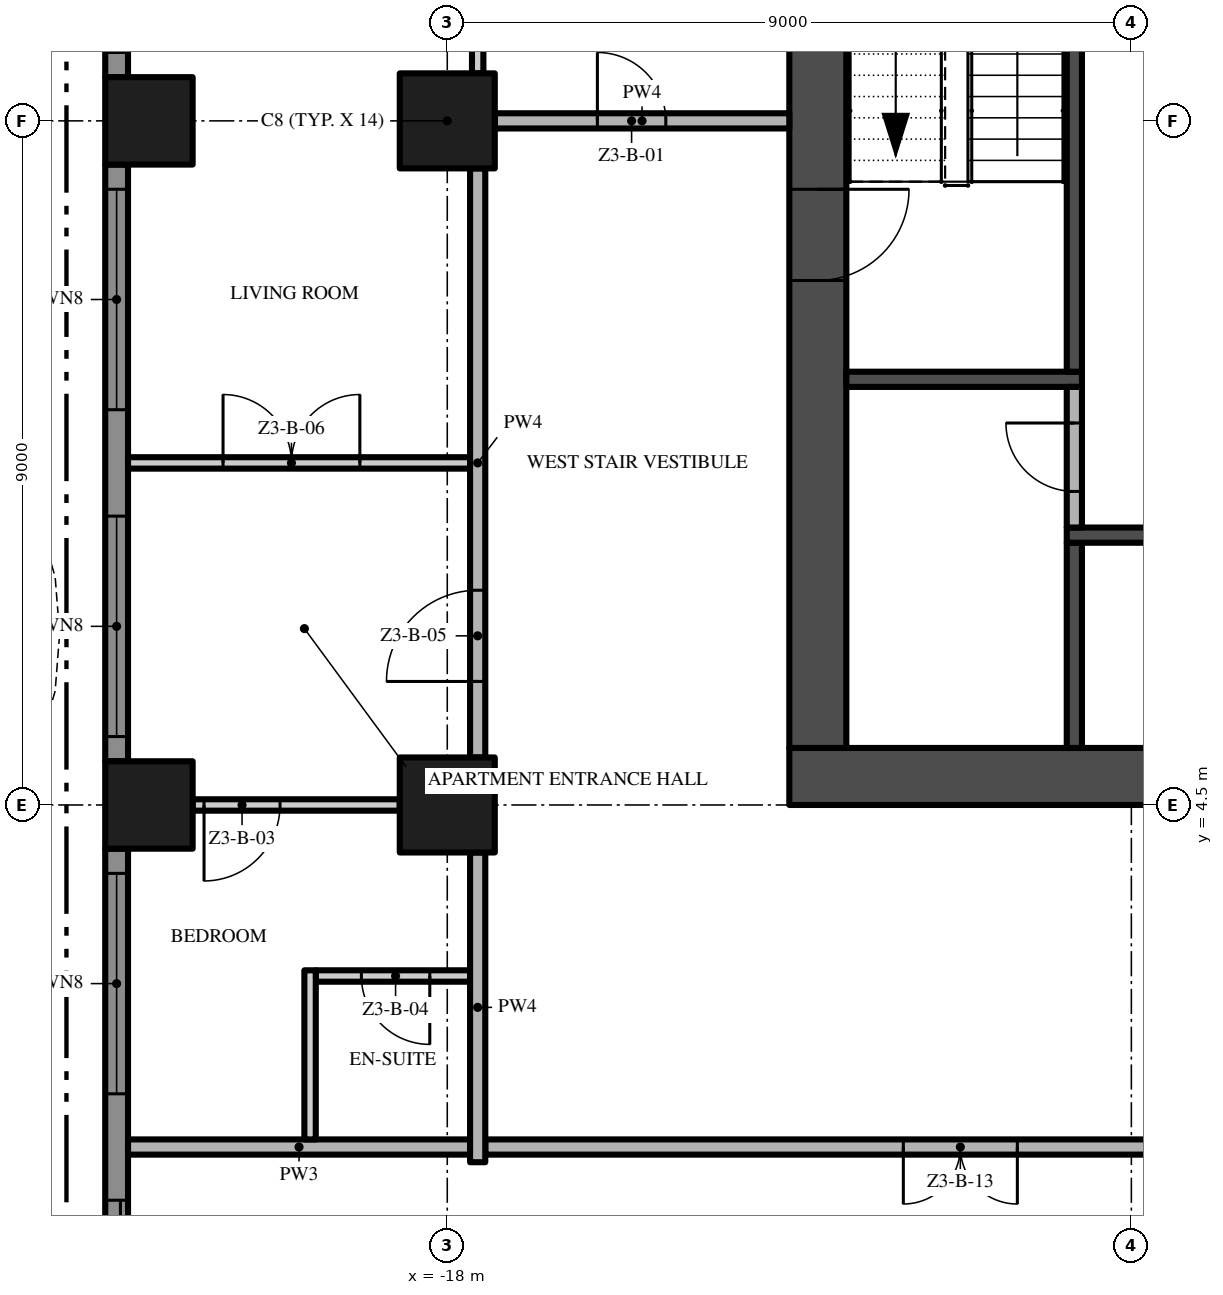
"""IFC4 building model, lengths in metres.
Left out: names, types, materials, properties, quantities, classifications, styles, units other than length and angle.
Written with IfcOpenShell. Run it as: python <this file> out.ifc"""

import sys

from ifc_helpers import new_model, si_unit, direction, frame, frame_2d, origin, origin_2d, place, context, subcontext, project, spatial, polyline, rectangle, outline, extrude, element, fill, save


model = new_model("IFC4")
c1 = context("Model", 3, precision=1e-05, world=origin(), true_north=direction((0.0, 1.0)))
c2 = subcontext(c1, "Body", "Model", "MODEL_VIEW")
j1 = project(units=[si_unit("LENGTHUNIT", "METRE"), si_unit("PLANEANGLEUNIT", "RADIAN")], contexts=[c1])
p1 = place(None, origin())
s1 = spatial("IfcSite", under=j1, at=p1, CompositionType="ELEMENT")
p2 = place(p1, origin())
s2 = spatial("IfcBuilding", under=s1, at=p2, CompositionType="ELEMENT")
p3 = place(p2, frame((0.0, 0.0, 144.0)))
s3 = spatial("IfcBuildingStorey", under=s2, at=p3, CompositionType="ELEMENT", Elevation=144.0)
p4 = place(p3, frame((-13.5, 4.875, -0.3), z_axis=(0.0, 0.0, 1.0), x_axis=(1.0, 0.0, 0.0)))
e1 = element("IfcWall", 1, at=p4, inside=s3, PredefinedType="SHEAR", context=c2, shape_type="SweptSolid", body=[
    extrude(rectangle(XDim=27.0, YDim=0.75, at=frame_2d((13.5, 0.0))), origin(), (0.0, 0.0, 1.0), 3.8),
])
p5 = place(p4, frame((12.0, 0.0, 0.3)))
e2 = element("IfcOpeningElement", 2, at=p5, cuts=e1, PredefinedType="OPENING", context=c2, shape_type="SweptSolid", body=[
    extrude(rectangle(XDim=3.0, YDim=2.4, at=frame_2d((1.5, 1.2))), frame((0.0, 0.385, 0.0), z_axis=(0.0, -1.0, 0.0), x_axis=(1.0, 0.0, 0.0)), (0.0, 0.0, 1.0), 0.77),
])
p6 = place(p4, frame((4.9, 0.0, 0.3)))
e3 = element("IfcOpeningElement", 3, at=p6, cuts=e1, PredefinedType="OPENING", context=c2, shape_type="SweptSolid", body=[
    extrude(rectangle(XDim=1.2, YDim=2.2, at=frame_2d((0.6, 1.1))), frame((0.0, 0.385, 0.0), z_axis=(0.0, -1.0, 0.0), x_axis=(1.0, 0.0, 0.0)), (0.0, 0.0, 1.0), 0.77),
])
p7 = place(p4, frame((20.75, 0.0, 0.3)))
e4 = element("IfcOpeningElement", 4, at=p7, cuts=e1, PredefinedType="OPENING", context=c2, shape_type="SweptSolid", body=[
    extrude(rectangle(XDim=1.5, YDim=2.2, at=frame_2d((0.75, 1.1))), frame((0.0, 0.385, 0.0), z_axis=(0.0, -1.0, 0.0), x_axis=(1.0, 0.0, 0.0)), (0.0, 0.0, 1.0), 0.77),
])
p8 = place(p4, frame((17.4, 0.0, 0.3)))
e5 = element("IfcOpeningElement", 5, at=p8, cuts=e1, PredefinedType="OPENING", context=c2, shape_type="SweptSolid", body=[
    extrude(rectangle(XDim=1.2, YDim=2.2, at=frame_2d((0.6, 1.1))), frame((0.0, 0.385, 0.0), z_axis=(0.0, -1.0, 0.0), x_axis=(1.0, 0.0, 0.0)), (0.0, 0.0, 1.0), 0.77),
])
p9 = place(p3, frame((-13.125, 21.75, -0.3), z_axis=(0.0, 0.0, 1.0), x_axis=(0.0, -1.0, 0.0)))
e6 = element("IfcWall", 6, at=p9, inside=s3, PredefinedType="SHEAR", context=c2, shape_type="SweptSolid", body=[
    extrude(rectangle(XDim=16.5, YDim=0.75, at=frame_2d((8.25, 0.0))), origin(), (0.0, 0.0, 1.0), 3.8),
])
p10 = place(p9, frame((9.15, 0.0, 0.3)))
e7 = element("IfcOpeningElement", 7, at=p10, cuts=e6, PredefinedType="OPENING", context=c2, shape_type="SweptSolid", body=[
    extrude(rectangle(XDim=1.2, YDim=2.2, at=frame_2d((0.6, 1.1))), frame((0.0, 0.385, 0.0), z_axis=(0.0, -1.0, 0.0), x_axis=(1.0, 0.0, 0.0)), (0.0, 0.0, 1.0), 0.77),
])
for number, where, z_axis, x_axis in (
    (8, (-18.0, 13.5, 0.0), (0.0, 0.0, 1.0), (1.0, 0.0, 0.0)),
    (9, (-18.0, 4.5, 0.0), (0.0, 0.0, 1.0), (1.0, 0.0, 0.0)),
):
    element("IfcColumn", number, at=place(p3, frame(where, z_axis=z_axis, x_axis=x_axis)), inside=s3, PredefinedType="COLUMN", context=c2, shape_type="SweptSolid", body=[
        extrude(rectangle(XDim=1.25, YDim=1.25, at=origin_2d()), origin(), (0.0, 0.0, 1.0), 3.5),
    ])
for number, where, z_axis, x_axis in (
    (10, (-21.925, 13.5, 0.0), (0.0, 0.0, 1.0), (1.0, 0.0, 0.0)),
    (11, (-21.925, 4.5, 0.0), (0.0, 0.0, 1.0), (1.0, 0.0, 0.0)),
):
    element("IfcColumn", number, at=place(p3, frame(where, z_axis=z_axis, x_axis=x_axis)), inside=s3, PredefinedType="COLUMN", context=c2, shape_type="SweptSolid", body=[
        extrude(rectangle(XDim=1.15, YDim=1.15, at=origin_2d()), origin(), (0.0, 0.0, 1.0), 3.5),
    ])
p11 = place(p3, frame((-22.35, 14.075, 0.0), z_axis=(0.0, 0.0, 1.0), x_axis=(0.0, 1.0, 0.0)))
e12 = element("IfcWall", 12, at=p11, inside=s3, PredefinedType="SOLIDWALL", context=c2, shape_type="SweptSolid", body=[
    extrude(rectangle(XDim=3.625, YDim=0.3, at=frame_2d((1.812, 0.0))), origin(), (0.0, 0.0, 1.0), 3.5),
])
p12 = place(p11, frame((0.325, 0.0, 0.0)))
e13 = element("IfcOpeningElement", 13, at=p12, cuts=e12, PredefinedType="OPENING", context=c2, shape_type="SweptSolid", body=[
    extrude(rectangle(XDim=2.9, YDim=2.4, at=frame_2d((1.45, 1.2))), frame((0.0, 0.16, 0.0), z_axis=(0.0, -1.0, 0.0), x_axis=(1.0, 0.0, 0.0)), (0.0, 0.0, 1.0), 0.32),
])
p13 = place(p3, frame((-22.35, 5.075, 0.0), z_axis=(0.0, 0.0, 1.0), x_axis=(0.0, 1.0, 0.0)))
e14 = element("IfcWall", 14, at=p13, inside=s3, PredefinedType="SOLIDWALL", context=c2, shape_type="SweptSolid", body=[
    extrude(rectangle(XDim=7.85, YDim=0.3, at=frame_2d((3.925, 0.0))), origin(), (0.0, 0.0, 1.0), 3.5),
])
p14 = place(p13, frame((4.625, 0.0, 0.45)))
e15 = element("IfcOpeningElement", 15, at=p14, cuts=e14, PredefinedType="OPENING", context=c2, shape_type="SweptSolid", body=[
    extrude(rectangle(XDim=2.9, YDim=2.65, at=frame_2d((1.45, 1.325))), frame((0.0, 0.16, 0.0), z_axis=(0.0, -1.0, 0.0), x_axis=(1.0, 0.0, 0.0)), (0.0, 0.0, 1.0), 0.32),
])
p15 = place(p13, frame((0.325, 0.0, 0.45)))
e16 = element("IfcOpeningElement", 16, at=p15, cuts=e14, PredefinedType="OPENING", context=c2, shape_type="SweptSolid", body=[
    extrude(rectangle(XDim=2.9, YDim=2.65, at=frame_2d((1.45, 1.325))), frame((0.0, 0.16, 0.0), z_axis=(0.0, -1.0, 0.0), x_axis=(1.0, 0.0, 0.0)), (0.0, 0.0, 1.0), 0.32),
])
p16 = place(p3, frame((-22.35, -3.925, 0.0), z_axis=(0.0, 0.0, 1.0), x_axis=(0.0, 1.0, 0.0)))
e17 = element("IfcWall", 17, at=p16, inside=s3, PredefinedType="SOLIDWALL", context=c2, shape_type="SweptSolid", body=[
    extrude(rectangle(XDim=7.85, YDim=0.3, at=frame_2d((3.925, 0.0))), origin(), (0.0, 0.0, 1.0), 3.5),
])
p17 = place(p16, frame((4.625, 0.0, 0.45)))
e18 = element("IfcOpeningElement", 18, at=p17, cuts=e17, PredefinedType="OPENING", context=c2, shape_type="SweptSolid", body=[
    extrude(rectangle(XDim=2.9, YDim=2.65, at=frame_2d((1.45, 1.325))), frame((0.0, 0.16, 0.0), z_axis=(0.0, -1.0, 0.0), x_axis=(1.0, 0.0, 0.0)), (0.0, 0.0, 1.0), 0.32),
])
p18 = place(p16, frame((0.325, 0.0, 0.0)))
e19 = element("IfcOpeningElement", 19, at=p18, cuts=e17, PredefinedType="OPENING", context=c2, shape_type="SweptSolid", body=[
    extrude(rectangle(XDim=2.9, YDim=2.4, at=frame_2d((1.45, 1.2))), frame((0.0, 0.16, 0.0), z_axis=(0.0, -1.0, 0.0), x_axis=(1.0, 0.0, 0.0)), (0.0, 0.0, 1.0), 0.32),
])
p19 = place(p3, origin())
e20 = element("IfcWall", 20, at=p19, inside=s3, PredefinedType="USERDEFINED", context=c2, shape_type="SweptSolid", body=[
    extrude(outline(polyline([(-24.3, 18.0), (-25.005, 16.5), (-25.441, 15.0), (-25.5, 14.25), (-25.441, 13.5), (-25.005, 12.0), (-24.3, 10.5), (-23.595, 9.0), (-23.159, 7.5), (-23.1, 6.75), (-23.159, 6.0), (-23.595, 4.5), (-24.3, 3.0), (-25.005, 1.5), (-25.441, 0.0), (-25.5, -0.75), (-25.441, -1.5), (-25.005, -3.0), (-24.3, -4.5), (-23.595, -6.0), (-23.159, -7.5), (-23.1, -8.25), (-23.159, -9.0), (-23.595, -10.5), (-24.3, -12.0), (-25.005, -13.5), (-24.779, -13.606), (-24.074, -12.106), (-23.36, -10.589), (-22.911, -9.045), (-22.849, -8.25), (-22.911, -7.455), (-23.36, -5.911), (-24.074, -4.394), (-24.771, -2.911), (-25.194, -1.455), (-25.249, -0.75), (-25.194, -0.045), (-24.771, 1.411), (-24.074, 2.894), (-23.36, 4.411), (-22.911, 5.955), (-22.849, 6.75), (-22.911, 7.545), (-23.36, 9.089), (-24.074, 10.606), (-24.771, 12.089), (-25.194, 13.545), (-25.249, 14.25), (-25.194, 14.955), (-24.771, 16.411), (-24.074, 17.894), (-24.3, 18.0)])), origin(), (0.0, 0.0, 1.0), 0.9),
])
p20 = place(p3, frame((-12.75, 10.1, 0.0), z_axis=(0.0, 0.0, 1.0), x_axis=(1.0, 0.0, 0.0)))
e21 = element("IfcWall", 21, at=p20, inside=s3, PredefinedType="SHEAR", context=c2, shape_type="SweptSolid", body=[
    extrude(rectangle(XDim=3.1, YDim=0.2, at=frame_2d((1.55, 0.0))), origin(), (0.0, 0.0, 1.0), 3.5),
])
p21 = place(p3, frame((-9.75, 5.25, 0.0), z_axis=(0.0, 0.0, 1.0), x_axis=(0.0, 1.0, 0.0)))
e22 = element("IfcWall", 22, at=p21, inside=s3, PredefinedType="SHEAR", context=c2, shape_type="SweptSolid", body=[
    extrude(rectangle(XDim=2.7, YDim=0.2, at=frame_2d((1.35, 0.0))), origin(), (0.0, 0.0, 1.0), 3.5),
])
p22 = place(p3, frame((-9.85, 8.05, 0.0), z_axis=(0.0, 0.0, 1.0), x_axis=(1.0, 0.0, 0.0)))
e23 = element("IfcWall", 23, at=p22, inside=s3, PredefinedType="SHEAR", context=c2, shape_type="SweptSolid", body=[
    extrude(rectangle(XDim=8.35, YDim=0.2, at=frame_2d((4.175, 0.0))), origin(), (0.0, 0.0, 1.0), 3.5),
])
p23 = place(p3, frame((-9.75, 8.15, 0.0), z_axis=(0.0, 0.0, 1.0), x_axis=(0.0, 1.0, 0.0)))
e24 = element("IfcWall", 24, at=p23, inside=s3, PredefinedType="PARTITIONING", context=c2, shape_type="SweptSolid", body=[
    extrude(rectangle(XDim=1.85, YDim=0.2, at=frame_2d((0.925, 0.0))), origin(), (0.0, 0.0, 1.0), 3.5),
])
p24 = place(p23, frame((0.475, 0.0, 0.0)))
e25 = element("IfcOpeningElement", 25, at=p24, cuts=e24, PredefinedType="OPENING", context=c2, shape_type="SweptSolid", body=[
    extrude(rectangle(XDim=0.9, YDim=2.1, at=frame_2d((0.45, 1.05))), frame((0.0, 0.11, 0.0), z_axis=(0.0, -1.0, 0.0), x_axis=(1.0, 0.0, 0.0)), (0.0, 0.0, 1.0), 0.22),
])
p25 = place(p3, frame((-9.75, 10.2, 0.0), z_axis=(0.0, 0.0, 1.0), x_axis=(0.0, 1.0, 0.0)))
e26 = element("IfcWall", 26, at=p25, inside=s3, PredefinedType="SHEAR", context=c2, shape_type="SweptSolid", body=[
    extrude(rectangle(XDim=5.7, YDim=0.2, at=frame_2d((2.85, 0.0))), origin(), (0.0, 0.0, 1.0), 3.5),
])
p26 = place(p3, frame((17.5, 0.0, 0.0), z_axis=(0.0, 0.0, 1.0), x_axis=(-1.0, 0.0, 0.0)))
e27 = element("IfcWall", 27, at=p26, inside=s3, PredefinedType="PARTITIONING", context=c2, shape_type="SweptSolid", body=[
    extrude(rectangle(XDim=35.0, YDim=0.2, at=frame_2d((17.5, 0.0))), origin(), (0.0, 0.0, 1.0), 3.5),
])
p27 = place(p26, frame((28.0, 0.0, 0.0)))
e28 = element("IfcOpeningElement", 28, at=p27, cuts=e27, PredefinedType="OPENING", context=c2, shape_type="SweptSolid", body=[
    extrude(rectangle(XDim=1.5, YDim=2.4, at=frame_2d((0.75, 1.2))), frame((0.0, 0.11, 0.0), z_axis=(0.0, -1.0, 0.0), x_axis=(1.0, 0.0, 0.0)), (0.0, 0.0, 1.0), 0.22),
])
p28 = place(p26, frame((10.0, 0.0, 0.0)))
e29 = element("IfcOpeningElement", 29, at=p28, cuts=e27, PredefinedType="OPENING", context=c2, shape_type="SweptSolid", body=[
    extrude(rectangle(XDim=1.5, YDim=2.4, at=frame_2d((0.75, 1.2))), frame((0.0, 0.11, 0.0), z_axis=(0.0, -1.0, 0.0), x_axis=(1.0, 0.0, 0.0)), (0.0, 0.0, 1.0), 0.22),
])
p29 = place(p3, frame((-22.2, 0.0, 0.0), z_axis=(0.0, 0.0, 1.0), x_axis=(1.0, 0.0, 0.0)))
e30 = element("IfcWall", 30, at=p29, inside=s3, PredefinedType="PARTITIONING", context=c2, shape_type="SweptSolid", body=[
    extrude(rectangle(XDim=4.5, YDim=0.2, at=frame_2d((2.25, 0.0))), origin(), (0.0, 0.0, 1.0), 3.5),
])
p30 = place(p3, frame((-17.7, 2.25, 0.0), z_axis=(0.0, 0.0, 1.0), x_axis=(-1.0, 0.0, 0.0)))
e31 = element("IfcWall", 31, at=p30, inside=s3, PredefinedType="PARTITIONING", context=c2, shape_type="SweptSolid", body=[
    extrude(rectangle(XDim=2.03, YDim=0.15, at=frame_2d((1.015, 0.0))), origin(), (0.0, 0.0, 1.0), 3.5),
])
p31 = place(p30, frame((0.53, 0.0, 0.0)))
e32 = element("IfcOpeningElement", 32, at=p31, cuts=e31, PredefinedType="OPENING", context=c2, shape_type="SweptSolid", body=[
    extrude(rectangle(XDim=0.9, YDim=2.1, at=frame_2d((0.45, 1.05))), frame((0.0, 0.085, 0.0), z_axis=(0.0, -1.0, 0.0), x_axis=(1.0, 0.0, 0.0)), (0.0, 0.0, 1.0), 0.17),
])
p32 = place(p3, frame((-18.625, 4.5, 0.0), z_axis=(0.0, 0.0, 1.0), x_axis=(-1.0, 0.0, 0.0)))
e33 = element("IfcWall", 33, at=p32, inside=s3, PredefinedType="PARTITIONING", context=c2, shape_type="SweptSolid", body=[
    extrude(rectangle(XDim=2.725, YDim=0.15, at=frame_2d((1.363, 0.0))), origin(), (0.0, 0.0, 1.0), 3.5),
])
p33 = place(p32, frame((1.575, 0.0, 0.0)))
e34 = element("IfcOpeningElement", 34, at=p33, cuts=e33, PredefinedType="OPENING", context=c2, shape_type="SweptSolid", body=[
    extrude(rectangle(XDim=1.0, YDim=2.4, at=frame_2d((0.5, 1.2))), frame((0.0, 0.085, 0.0), z_axis=(0.0, -1.0, 0.0), x_axis=(1.0, 0.0, 0.0)), (0.0, 0.0, 1.0), 0.17),
])
p34 = place(p3, frame((-22.2, 9.0, 0.0), z_axis=(0.0, 0.0, 1.0), x_axis=(1.0, 0.0, 0.0)))
e35 = element("IfcWall", 35, at=p34, inside=s3, PredefinedType="PARTITIONING", context=c2, shape_type="SweptSolid", body=[
    extrude(rectangle(XDim=4.5, YDim=0.15, at=frame_2d((2.25, 0.0))), origin(), (0.0, 0.0, 1.0), 3.5),
])
p35 = place(p34, frame((1.25, 0.0, 0.0)))
e36 = element("IfcOpeningElement", 36, at=p35, cuts=e35, PredefinedType="OPENING", context=c2, shape_type="SweptSolid", body=[
    extrude(rectangle(XDim=1.8, YDim=2.4, at=frame_2d((0.9, 1.2))), frame((0.0, 0.085, 0.0), z_axis=(0.0, -1.0, 0.0), x_axis=(1.0, 0.0, 0.0)), (0.0, 0.0, 1.0), 0.17),
])
p36 = place(p3, frame((-17.375, 13.5, 0.0), z_axis=(0.0, 0.0, 1.0), x_axis=(1.0, 0.0, 0.0)))
e37 = element("IfcWall", 37, at=p36, inside=s3, PredefinedType="PARTITIONING", context=c2, shape_type="SweptSolid", body=[
    extrude(rectangle(XDim=3.875, YDim=0.2, at=frame_2d((1.938, 0.0))), origin(), (0.0, 0.0, 1.0), 3.5),
])
p37 = place(p36, frame((1.35, 0.0, 0.0)))
e38 = element("IfcOpeningElement", 38, at=p37, cuts=e37, PredefinedType="OPENING", context=c2, shape_type="SweptSolid", body=[
    extrude(rectangle(XDim=0.9, YDim=2.1, at=frame_2d((0.45, 1.05))), frame((0.0, 0.11, 0.0), z_axis=(0.0, -1.0, 0.0), x_axis=(1.0, 0.0, 0.0)), (0.0, 0.0, 1.0), 0.22),
])
p38 = place(p3, frame((-19.805, 0.1, 0.0), z_axis=(0.0, 0.0, 1.0), x_axis=(0.0, 1.0, 0.0)))
e39 = element("IfcWall", 39, at=p38, inside=s3, PredefinedType="PARTITIONING", context=c2, shape_type="SweptSolid", body=[
    extrude(rectangle(XDim=2.225, YDim=0.15, at=frame_2d((1.113, 0.0))), origin(), (0.0, 0.0, 1.0), 3.5),
])
p39 = place(p3, frame((-17.6, -0.2, 0.0), z_axis=(0.0, 0.0, 1.0), x_axis=(0.0, 1.0, 0.0)))
e40 = element("IfcWall", 40, at=p39, inside=s3, PredefinedType="PARTITIONING", context=c2, shape_type="SweptSolid", body=[
    extrude(rectangle(XDim=4.075, YDim=0.2, at=frame_2d((2.038, 0.0))), origin(), (0.0, 0.0, 1.0), 3.5),
])
p40 = place(p3, frame((-17.6, 5.125, 0.0), z_axis=(0.0, 0.0, 1.0), x_axis=(0.0, 1.0, 0.0)))
e41 = element("IfcWall", 41, at=p40, inside=s3, PredefinedType="PARTITIONING", context=c2, shape_type="SweptSolid", body=[
    extrude(rectangle(XDim=7.75, YDim=0.2, at=frame_2d((3.875, 0.0))), origin(), (0.0, 0.0, 1.0), 3.5),
])
p41 = place(p40, frame((1.0, 0.0, 0.0)))
e42 = element("IfcOpeningElement", 42, at=p41, cuts=e41, PredefinedType="OPENING", context=c2, shape_type="SweptSolid", body=[
    extrude(rectangle(XDim=1.2, YDim=2.4, at=frame_2d((0.6, 1.2))), frame((0.0, 0.11, 0.0), z_axis=(0.0, -1.0, 0.0), x_axis=(1.0, 0.0, 0.0)), (0.0, 0.0, 1.0), 0.22),
])
p42 = place(p3, frame((-17.6, 14.125, 0.0), z_axis=(0.0, 0.0, 1.0), x_axis=(0.0, 1.0, 0.0)))
e43 = element("IfcWall", 43, at=p42, inside=s3, PredefinedType="PARTITIONING", context=c2, shape_type="SweptSolid", body=[
    extrude(rectangle(XDim=3.3, YDim=0.15, at=frame_2d((1.65, 0.0))), origin(), (0.0, 0.0, 1.0), 3.5),
])
p43 = place(p12, origin())
e44 = element("IfcDoor", 44, at=p43, inside=s3, OperationType="SINGLE_SWING_LEFT", PredefinedType="DOOR", context=c2, shape_type="SweptSolid", body=[
    extrude(rectangle(XDim=2.9, YDim=2.4, at=frame_2d((1.45, 1.2))), frame((0.0, 0.025, 0.0), z_axis=(0.0, -1.0, 0.0), x_axis=(1.0, 0.0, 0.0)), (0.0, 0.0, 1.0), 0.05),
])
fill(e13, e44)
p44 = place(p14, origin())
e45 = element("IfcWindow", 45, at=p44, inside=s3, PartitioningType="SINGLE_PANEL", PredefinedType="WINDOW", context=c2, shape_type="SweptSolid", body=[
    extrude(rectangle(XDim=2.9, YDim=2.65, at=frame_2d((1.45, 1.325))), frame((0.0, 0.03, 0.0), z_axis=(0.0, -1.0, 0.0), x_axis=(1.0, 0.0, 0.0)), (0.0, 0.0, 1.0), 0.06),
])
fill(e15, e45)
p45 = place(p15, origin())
e46 = element("IfcWindow", 46, at=p45, inside=s3, PartitioningType="SINGLE_PANEL", PredefinedType="WINDOW", context=c2, shape_type="SweptSolid", body=[
    extrude(rectangle(XDim=2.9, YDim=2.65, at=frame_2d((1.45, 1.325))), frame((0.0, 0.03, 0.0), z_axis=(0.0, -1.0, 0.0), x_axis=(1.0, 0.0, 0.0)), (0.0, 0.0, 1.0), 0.06),
])
fill(e16, e46)
p46 = place(p17, origin())
e47 = element("IfcWindow", 47, at=p46, inside=s3, PartitioningType="SINGLE_PANEL", PredefinedType="WINDOW", context=c2, shape_type="SweptSolid", body=[
    extrude(rectangle(XDim=2.9, YDim=2.65, at=frame_2d((1.45, 1.325))), frame((0.0, 0.03, 0.0), z_axis=(0.0, -1.0, 0.0), x_axis=(1.0, 0.0, 0.0)), (0.0, 0.0, 1.0), 0.06),
])
fill(e18, e47)
p47 = place(p18, origin())
e48 = element("IfcDoor", 48, at=p47, inside=s3, OperationType="SINGLE_SWING_LEFT", PredefinedType="DOOR", context=c2, shape_type="SweptSolid", body=[
    extrude(rectangle(XDim=2.9, YDim=2.4, at=frame_2d((1.45, 1.2))), frame((0.0, 0.025, 0.0), z_axis=(0.0, -1.0, 0.0), x_axis=(1.0, 0.0, 0.0)), (0.0, 0.0, 1.0), 0.05),
])
fill(e19, e48)
p48 = place(p10, frame((1.2, 0.0, 0.0), z_axis=(0.0, 0.0, 1.0), x_axis=(-1.0, 0.0, 0.0)))
e49 = element("IfcDoor", 49, at=p48, inside=s3, OperationType="SINGLE_SWING_RIGHT", PredefinedType="DOOR", context=c2, shape_type="SweptSolid", body=[
    extrude(rectangle(XDim=1.2, YDim=2.2, at=frame_2d((0.6, 1.1))), frame((0.0, 0.025, 0.0), z_axis=(0.0, -1.0, 0.0), x_axis=(1.0, 0.0, 0.0)), (0.0, 0.0, 1.0), 0.05),
])
fill(e7, e49)
p49 = place(p24, origin())
e50 = element("IfcDoor", 50, at=p49, inside=s3, OperationType="SINGLE_SWING_RIGHT", PredefinedType="DOOR", context=c2, shape_type="SweptSolid", body=[
    extrude(rectangle(XDim=0.9, YDim=2.1, at=frame_2d((0.45, 1.05))), frame((0.0, 0.025, 0.0), z_axis=(0.0, -1.0, 0.0), x_axis=(1.0, 0.0, 0.0)), (0.0, 0.0, 1.0), 0.05),
])
fill(e25, e50)
p50 = place(p37, origin())
e51 = element("IfcDoor", 51, at=p50, inside=s3, OperationType="SINGLE_SWING_LEFT", PredefinedType="DOOR", context=c2, shape_type="SweptSolid", body=[
    extrude(rectangle(XDim=0.9, YDim=2.1, at=frame_2d((0.45, 1.05))), frame((0.0, 0.025, 0.0), z_axis=(0.0, -1.0, 0.0), x_axis=(1.0, 0.0, 0.0)), (0.0, 0.0, 1.0), 0.05),
])
fill(e38, e51)
p51 = place(p33, origin())
e52 = element("IfcDoor", 52, at=p51, inside=s3, OperationType="SINGLE_SWING_RIGHT", PredefinedType="DOOR", context=c2, shape_type="SweptSolid", body=[
    extrude(rectangle(XDim=1.0, YDim=2.4, at=frame_2d((0.5, 1.2))), frame((0.0, 0.025, 0.0), z_axis=(0.0, -1.0, 0.0), x_axis=(1.0, 0.0, 0.0)), (0.0, 0.0, 1.0), 0.05),
])
fill(e34, e52)
p52 = place(p31, origin())
e53 = element("IfcDoor", 53, at=p52, inside=s3, OperationType="SINGLE_SWING_LEFT", PredefinedType="DOOR", context=c2, shape_type="SweptSolid", body=[
    extrude(rectangle(XDim=0.9, YDim=2.1, at=frame_2d((0.45, 1.05))), frame((0.0, 0.025, 0.0), z_axis=(0.0, -1.0, 0.0), x_axis=(1.0, 0.0, 0.0)), (0.0, 0.0, 1.0), 0.05),
])
fill(e32, e53)
p53 = place(p41, origin())
e54 = element("IfcDoor", 54, at=p53, inside=s3, OperationType="SINGLE_SWING_LEFT", PredefinedType="DOOR", context=c2, shape_type="SweptSolid", body=[
    extrude(rectangle(XDim=1.2, YDim=2.4, at=frame_2d((0.6, 1.2))), frame((0.0, 0.025, 0.0), z_axis=(0.0, -1.0, 0.0), x_axis=(1.0, 0.0, 0.0)), (0.0, 0.0, 1.0), 0.05),
])
fill(e42, e54)
p54 = place(p35, origin())
e55 = element("IfcDoor", 55, at=p54, inside=s3, OperationType="DOUBLE_DOOR_SINGLE_SWING", PredefinedType="DOOR", context=c2, shape_type="SweptSolid", body=[
    extrude(rectangle(XDim=1.8, YDim=2.4, at=frame_2d((0.9, 1.2))), frame((0.0, 0.025, 0.0), z_axis=(0.0, -1.0, 0.0), x_axis=(1.0, 0.0, 0.0)), (0.0, 0.0, 1.0), 0.05),
])
fill(e36, e55)
p55 = place(p27, origin())
e56 = element("IfcDoor", 56, at=p55, inside=s3, OperationType="DOUBLE_DOOR_SINGLE_SWING", PredefinedType="DOOR", context=c2, shape_type="SweptSolid", body=[
    extrude(rectangle(XDim=1.5, YDim=2.4, at=frame_2d((0.75, 1.2))), frame((0.0, 0.025, 0.0), z_axis=(0.0, -1.0, 0.0), x_axis=(1.0, 0.0, 0.0)), (0.0, 0.0, 1.0), 0.05),
])
fill(e28, e56)
save(model, sys.argv[1])
